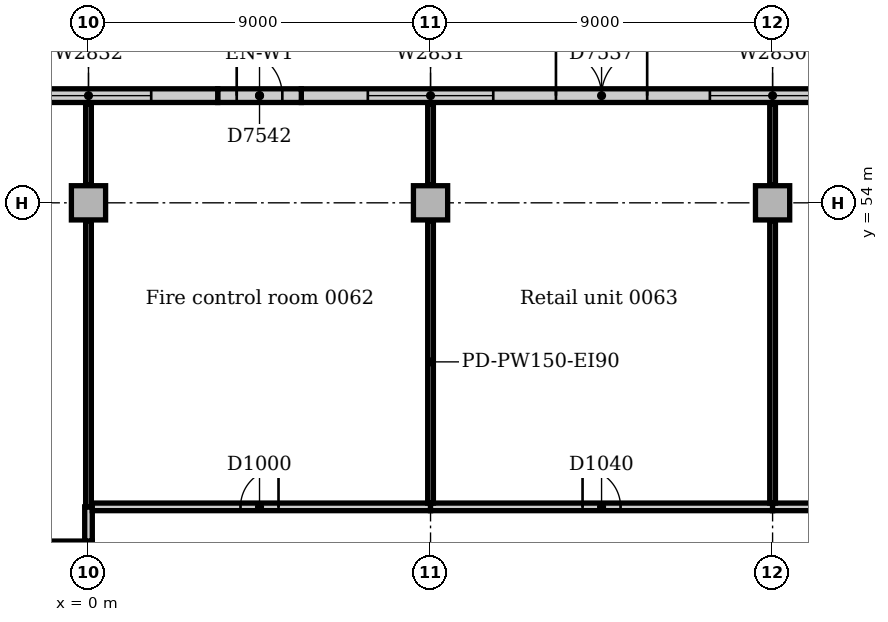
"""IFC4 building model, lengths in metres.
Left out: names, types, materials, properties, quantities, classifications, styles, units other than length and angle.
Written with IfcOpenShell. Run it as: python <this file> out.ifc"""

import sys

from ifc_helpers import new_model, si_unit, direction, frame, frame_2d, origin, origin_2d, place, context, subcontext, project, spatial, rectangle, extrude, element, fill, save


model = new_model("IFC4")
c1 = context("Model", 3, precision=1e-05, world=origin(), true_north=direction((0.0, 1.0)))
c2 = subcontext(c1, "Body", "Model", "MODEL_VIEW")
j1 = project(units=[si_unit("LENGTHUNIT", "METRE"), si_unit("PLANEANGLEUNIT", "RADIAN")], contexts=[c1])
p1 = place(None, origin())
s1 = spatial("IfcSite", under=j1, at=p1, CompositionType="ELEMENT")
p2 = place(p1, origin())
s2 = spatial("IfcBuilding", under=s1, at=p2, CompositionType="ELEMENT")
p3 = place(p2, origin())
s3 = spatial("IfcBuildingStorey", under=s2, at=p3, CompositionType="ELEMENT", Elevation=0.0)
for number, where, z_axis, x_axis in (
    (1, (0.0, 54.0, 0.0), (0.0, 0.0, 1.0), (1.0, 0.0, 0.0)),
    (2, (9.0, 54.0, 0.0), (0.0, 0.0, 1.0), (1.0, 0.0, 0.0)),
    (3, (18.0, 54.0, 0.0), (0.0, 0.0, 1.0), (1.0, 0.0, 0.0)),
):
    element("IfcColumn", number, at=place(p3, frame(where, z_axis=z_axis, x_axis=x_axis)), inside=s3, PredefinedType="COLUMN", context=c2, shape_type="SweptSolid", body=[
        extrude(rectangle(XDim=0.9, YDim=0.9, at=origin_2d()), origin(), (0.0, 0.0, 1.0), 5.7),
    ])
p4 = place(p3, frame((63.0, 56.82, 0.0), z_axis=(0.0, 0.0, 1.0), x_axis=(-1.0, 0.0, 0.0)))
e4 = element("IfcWall", 4, at=p4, inside=s3, PredefinedType="STANDARD", context=c2, shape_type="SweptSolid", body=[
    extrude(rectangle(XDim=57.4, YDim=0.36, at=frame_2d((28.7, 0.0))), origin(), (0.0, 0.0, 1.0), 5.7),
])
p5 = place(p4, frame((32.55, 0.0, 0.0)))
e5 = element("IfcOpeningElement", 5, at=p5, cuts=e4, PredefinedType="OPENING", context=c2, shape_type="SweptSolid", body=[
    extrude(rectangle(XDim=2.4, YDim=2.4, at=frame_2d((1.2, 1.2))), frame((0.0, 0.19, 0.0), z_axis=(0.0, -1.0, 0.0), x_axis=(1.0, 0.0, 0.0)), (0.0, 0.0, 1.0), 0.38),
])
p6 = place(p4, frame((48.3, 0.0, 0.0)))
e6 = element("IfcOpeningElement", 6, at=p6, cuts=e4, PredefinedType="OPENING", context=c2, shape_type="SweptSolid", body=[
    extrude(rectangle(XDim=2.4, YDim=2.2, at=frame_2d((1.2, 1.1))), frame((0.0, 0.19, 0.0), z_axis=(0.0, -1.0, 0.0), x_axis=(1.0, 0.0, 0.0)), (0.0, 0.0, 1.0), 0.38),
])
p7 = place(p4, frame((39.3, 0.0, 0.0)))
e7 = element("IfcOpeningElement", 7, at=p7, cuts=e4, PredefinedType="OPENING", context=c2, shape_type="SweptSolid", body=[
    extrude(rectangle(XDim=2.4, YDim=2.2, at=frame_2d((1.2, 1.1))), frame((0.0, 0.19, 0.0), z_axis=(0.0, -1.0, 0.0), x_axis=(1.0, 0.0, 0.0)), (0.0, 0.0, 1.0), 0.38),
])
p8 = place(p4, frame((12.3, 0.0, 0.0)))
e8 = element("IfcOpeningElement", 8, at=p8, cuts=e4, PredefinedType="OPENING", context=c2, shape_type="SweptSolid", body=[
    extrude(rectangle(XDim=2.4, YDim=2.2, at=frame_2d((1.2, 1.1))), frame((0.0, 0.19, 0.0), z_axis=(0.0, -1.0, 0.0), x_axis=(1.0, 0.0, 0.0)), (0.0, 0.0, 1.0), 0.38),
])
p9 = place(p4, frame((21.6, 0.0, 0.0)))
e9 = element("IfcOpeningElement", 9, at=p9, cuts=e4, PredefinedType="OPENING", context=c2, shape_type="SweptSolid", body=[
    extrude(rectangle(XDim=1.8, YDim=2.2, at=frame_2d((0.9, 1.1))), frame((0.0, 0.19, 0.0), z_axis=(0.0, -1.0, 0.0), x_axis=(1.0, 0.0, 0.0)), (0.0, 0.0, 1.0), 0.38),
])
p10 = place(p4, frame((2.1, 0.0, 0.0)))
e10 = element("IfcOpeningElement", 10, at=p10, cuts=e4, PredefinedType="OPENING", context=c2, shape_type="SweptSolid", body=[
    extrude(rectangle(XDim=1.8, YDim=2.2, at=frame_2d((0.9, 1.1))), frame((0.0, 0.19, 0.0), z_axis=(0.0, -1.0, 0.0), x_axis=(1.0, 0.0, 0.0)), (0.0, 0.0, 1.0), 0.38),
])
p11 = place(p4, frame((7.35, 0.0, 0.6)))
e11 = element("IfcOpeningElement", 11, at=p11, cuts=e4, PredefinedType="OPENING", context=c2, shape_type="SweptSolid", body=[
    extrude(rectangle(XDim=3.3, YDim=3.0, at=frame_2d((1.65, 1.5))), frame((0.0, 0.19, 0.0), z_axis=(0.0, -1.0, 0.0), x_axis=(1.0, 0.0, 0.0)), (0.0, 0.0, 1.0), 0.38),
])
p12 = place(p4, frame((16.35, 0.0, 0.6)))
e12 = element("IfcOpeningElement", 12, at=p12, cuts=e4, PredefinedType="OPENING", context=c2, shape_type="SweptSolid", body=[
    extrude(rectangle(XDim=3.3, YDim=3.0, at=frame_2d((1.65, 1.5))), frame((0.0, 0.19, 0.0), z_axis=(0.0, -1.0, 0.0), x_axis=(1.0, 0.0, 0.0)), (0.0, 0.0, 1.0), 0.38),
])
p13 = place(p4, frame((25.35, 0.0, 0.6)))
e13 = element("IfcOpeningElement", 13, at=p13, cuts=e4, PredefinedType="OPENING", context=c2, shape_type="SweptSolid", body=[
    extrude(rectangle(XDim=3.3, YDim=3.0, at=frame_2d((1.65, 1.5))), frame((0.0, 0.19, 0.0), z_axis=(0.0, -1.0, 0.0), x_axis=(1.0, 0.0, 0.0)), (0.0, 0.0, 1.0), 0.38),
])
p14 = place(p4, frame((43.35, 0.0, 0.6)))
e14 = element("IfcOpeningElement", 14, at=p14, cuts=e4, PredefinedType="OPENING", context=c2, shape_type="SweptSolid", body=[
    extrude(rectangle(XDim=3.3, YDim=3.0, at=frame_2d((1.65, 1.5))), frame((0.0, 0.19, 0.0), z_axis=(0.0, -1.0, 0.0), x_axis=(1.0, 0.0, 0.0)), (0.0, 0.0, 1.0), 0.38),
])
p15 = place(p4, frame((52.35, 0.0, 0.6)))
e15 = element("IfcOpeningElement", 15, at=p15, cuts=e4, PredefinedType="OPENING", context=c2, shape_type="SweptSolid", body=[
    extrude(rectangle(XDim=3.3, YDim=3.0, at=frame_2d((1.65, 1.5))), frame((0.0, 0.19, 0.0), z_axis=(0.0, -1.0, 0.0), x_axis=(1.0, 0.0, 0.0)), (0.0, 0.0, 1.0), 0.38),
])
p16 = place(p3, frame((5.6, 56.82, 0.0), z_axis=(0.0, 0.0, 1.0), x_axis=(-1.0, 0.0, 0.0)))
e16 = element("IfcWall", 16, at=p16, inside=s3, PredefinedType="STANDARD", context=c2, shape_type="SweptSolid", body=[
    extrude(rectangle(XDim=2.2, YDim=0.36, at=frame_2d((1.1, 0.0))), origin(), (0.0, 0.0, 1.0), 5.7),
])
p17 = place(p16, frame((0.5, 0.0, 0.0)))
e17 = element("IfcOpeningElement", 17, at=p17, cuts=e16, PredefinedType="OPENING", context=c2, shape_type="SweptSolid", body=[
    extrude(rectangle(XDim=1.2, YDim=2.2, at=frame_2d((0.6, 1.1))), frame((0.0, 0.19, 0.0), z_axis=(0.0, -1.0, 0.0), x_axis=(1.0, 0.0, 0.0)), (0.0, 0.0, 1.0), 0.38),
])
p18 = place(p3, frame((3.4, 56.82, 0.0), z_axis=(0.0, 0.0, 1.0), x_axis=(-1.0, 0.0, 0.0)))
e18 = element("IfcWall", 18, at=p18, inside=s3, PredefinedType="STANDARD", context=c2, shape_type="SweptSolid", body=[
    extrude(rectangle(XDim=84.4, YDim=0.36, at=frame_2d((42.2, 0.0))), origin(), (0.0, 0.0, 1.0), 5.7),
])
p19 = place(p18, frame((15.7, 0.0, 0.0)))
e19 = element("IfcOpeningElement", 19, at=p19, cuts=e18, PredefinedType="OPENING", context=c2, shape_type="SweptSolid", body=[
    extrude(rectangle(XDim=2.4, YDim=2.4, at=frame_2d((1.2, 1.2))), frame((0.0, 0.19, 0.0), z_axis=(0.0, -1.0, 0.0), x_axis=(1.0, 0.0, 0.0)), (0.0, 0.0, 1.0), 0.38),
])
p20 = place(p18, frame((76.6, 0.0, 0.0)))
e20 = element("IfcOpeningElement", 20, at=p20, cuts=e18, PredefinedType="OPENING", context=c2, shape_type="SweptSolid", body=[
    extrude(rectangle(XDim=6.6, YDim=4.2, at=frame_2d((3.3, 2.1))), frame((0.0, 0.19, 0.0), z_axis=(0.0, -1.0, 0.0), x_axis=(1.0, 0.0, 0.0)), (0.0, 0.0, 1.0), 0.38),
])
p21 = place(p18, frame((59.65, 0.0, 0.0)))
e21 = element("IfcOpeningElement", 21, at=p21, cuts=e18, PredefinedType="OPENING", context=c2, shape_type="SweptSolid", body=[
    extrude(rectangle(XDim=4.5, YDim=4.2, at=frame_2d((2.25, 2.1))), frame((0.0, 0.19, 0.0), z_axis=(0.0, -1.0, 0.0), x_axis=(1.0, 0.0, 0.0)), (0.0, 0.0, 1.0), 0.38),
])
p22 = place(p18, frame((58.3, 0.0, 0.0)))
e22 = element("IfcOpeningElement", 22, at=p22, cuts=e18, PredefinedType="OPENING", context=c2, shape_type="SweptSolid", body=[
    extrude(rectangle(XDim=1.2, YDim=2.2, at=frame_2d((0.6, 1.1))), frame((0.0, 0.19, 0.0), z_axis=(0.0, -1.0, 0.0), x_axis=(1.0, 0.0, 0.0)), (0.0, 0.0, 1.0), 0.38),
])
p23 = place(p18, frame((70.0, 0.0, 0.0)))
e23 = element("IfcOpeningElement", 23, at=p23, cuts=e18, PredefinedType="OPENING", context=c2, shape_type="SweptSolid", body=[
    extrude(rectangle(XDim=1.8, YDim=2.2, at=frame_2d((0.9, 1.1))), frame((0.0, 0.19, 0.0), z_axis=(0.0, -1.0, 0.0), x_axis=(1.0, 0.0, 0.0)), (0.0, 0.0, 1.0), 0.38),
])
p24 = place(p18, frame((52.0, 0.0, 0.0)))
e24 = element("IfcOpeningElement", 24, at=p24, cuts=e18, PredefinedType="OPENING", context=c2, shape_type="SweptSolid", body=[
    extrude(rectangle(XDim=1.8, YDim=2.2, at=frame_2d((0.9, 1.1))), frame((0.0, 0.19, 0.0), z_axis=(0.0, -1.0, 0.0), x_axis=(1.0, 0.0, 0.0)), (0.0, 0.0, 1.0), 0.38),
])
p25 = place(p18, frame((1.75, 0.0, 0.6)))
e25 = element("IfcOpeningElement", 25, at=p25, cuts=e18, PredefinedType="OPENING", context=c2, shape_type="SweptSolid", body=[
    extrude(rectangle(XDim=3.3, YDim=3.0, at=frame_2d((1.65, 1.5))), frame((0.0, 0.19, 0.0), z_axis=(0.0, -1.0, 0.0), x_axis=(1.0, 0.0, 0.0)), (0.0, 0.0, 1.0), 0.38),
])
p26 = place(p18, frame((6.25, 0.0, 0.6)))
e26 = element("IfcOpeningElement", 26, at=p26, cuts=e18, PredefinedType="OPENING", context=c2, shape_type="SweptSolid", body=[
    extrude(rectangle(XDim=3.3, YDim=3.0, at=frame_2d((1.65, 1.5))), frame((0.0, 0.19, 0.0), z_axis=(0.0, -1.0, 0.0), x_axis=(1.0, 0.0, 0.0)), (0.0, 0.0, 1.0), 0.38),
])
p27 = place(p18, frame((10.75, 0.0, 0.6)))
e27 = element("IfcOpeningElement", 27, at=p27, cuts=e18, PredefinedType="OPENING", context=c2, shape_type="SweptSolid", body=[
    extrude(rectangle(XDim=3.3, YDim=3.0, at=frame_2d((1.65, 1.5))), frame((0.0, 0.19, 0.0), z_axis=(0.0, -1.0, 0.0), x_axis=(1.0, 0.0, 0.0)), (0.0, 0.0, 1.0), 0.38),
])
p28 = place(p18, frame((19.75, 0.0, 0.6)))
e28 = element("IfcOpeningElement", 28, at=p28, cuts=e18, PredefinedType="OPENING", context=c2, shape_type="SweptSolid", body=[
    extrude(rectangle(XDim=3.3, YDim=3.0, at=frame_2d((1.65, 1.5))), frame((0.0, 0.19, 0.0), z_axis=(0.0, -1.0, 0.0), x_axis=(1.0, 0.0, 0.0)), (0.0, 0.0, 1.0), 0.38),
])
p29 = place(p18, frame((24.25, 0.0, 0.6)))
e29 = element("IfcOpeningElement", 29, at=p29, cuts=e18, PredefinedType="OPENING", context=c2, shape_type="SweptSolid", body=[
    extrude(rectangle(XDim=3.3, YDim=3.0, at=frame_2d((1.65, 1.5))), frame((0.0, 0.19, 0.0), z_axis=(0.0, -1.0, 0.0), x_axis=(1.0, 0.0, 0.0)), (0.0, 0.0, 1.0), 0.38),
])
p30 = place(p18, frame((28.75, 0.0, 0.6)))
e30 = element("IfcOpeningElement", 30, at=p30, cuts=e18, PredefinedType="OPENING", context=c2, shape_type="SweptSolid", body=[
    extrude(rectangle(XDim=3.3, YDim=3.0, at=frame_2d((1.65, 1.5))), frame((0.0, 0.19, 0.0), z_axis=(0.0, -1.0, 0.0), x_axis=(1.0, 0.0, 0.0)), (0.0, 0.0, 1.0), 0.38),
])
p31 = place(p18, frame((33.25, 0.0, 0.6)))
e31 = element("IfcOpeningElement", 31, at=p31, cuts=e18, PredefinedType="OPENING", context=c2, shape_type="SweptSolid", body=[
    extrude(rectangle(XDim=3.3, YDim=3.0, at=frame_2d((1.65, 1.5))), frame((0.0, 0.19, 0.0), z_axis=(0.0, -1.0, 0.0), x_axis=(1.0, 0.0, 0.0)), (0.0, 0.0, 1.0), 0.38),
])
p32 = place(p18, frame((37.75, 0.0, 0.6)))
e32 = element("IfcOpeningElement", 32, at=p32, cuts=e18, PredefinedType="OPENING", context=c2, shape_type="SweptSolid", body=[
    extrude(rectangle(XDim=3.3, YDim=3.0, at=frame_2d((1.65, 1.5))), frame((0.0, 0.19, 0.0), z_axis=(0.0, -1.0, 0.0), x_axis=(1.0, 0.0, 0.0)), (0.0, 0.0, 1.0), 0.38),
])
p33 = place(p18, frame((42.25, 0.0, 0.6)))
e33 = element("IfcOpeningElement", 33, at=p33, cuts=e18, PredefinedType="OPENING", context=c2, shape_type="SweptSolid", body=[
    extrude(rectangle(XDim=3.3, YDim=3.0, at=frame_2d((1.65, 1.5))), frame((0.0, 0.19, 0.0), z_axis=(0.0, -1.0, 0.0), x_axis=(1.0, 0.0, 0.0)), (0.0, 0.0, 1.0), 0.38),
])
p34 = place(p18, frame((46.75, 0.0, 0.6)))
e34 = element("IfcOpeningElement", 34, at=p34, cuts=e18, PredefinedType="OPENING", context=c2, shape_type="SweptSolid", body=[
    extrude(rectangle(XDim=3.3, YDim=3.0, at=frame_2d((1.65, 1.5))), frame((0.0, 0.19, 0.0), z_axis=(0.0, -1.0, 0.0), x_axis=(1.0, 0.0, 0.0)), (0.0, 0.0, 1.0), 0.38),
])
p35 = place(p3, frame((-8.53, 45.0, 0.0), z_axis=(0.0, 0.0, 1.0), x_axis=(1.0, 0.0, 0.0)))
e35 = element("IfcWall", 35, at=p35, inside=s3, PredefinedType="PARTITIONING", context=c2, shape_type="SweptSolid", body=[
    extrude(rectangle(XDim=8.63, YDim=0.2, at=frame_2d((4.315, 0.0))), origin(), (0.0, 0.0, 1.0), 5.7),
])
p36 = place(p3, frame((0.0, 45.1, 0.0), z_axis=(0.0, 0.0, 1.0), x_axis=(0.0, 1.0, 0.0)))
e36 = element("IfcWall", 36, at=p36, inside=s3, PredefinedType="PARTITIONING", context=c2, shape_type="SweptSolid", body=[
    extrude(rectangle(XDim=0.9, YDim=0.2, at=frame_2d((0.45, 0.0))), origin(), (0.0, 0.0, 1.0), 5.7),
])
p37 = place(p3, frame((0.0, 46.0, 0.0), z_axis=(0.0, 0.0, 1.0), x_axis=(0.0, 1.0, 0.0)))
e37 = element("IfcWall", 37, at=p37, inside=s3, PredefinedType="PARTITIONING", context=c2, shape_type="SweptSolid", body=[
    extrude(rectangle(XDim=7.53, YDim=0.15, at=frame_2d((3.765, 0.0))), origin(), (0.0, 0.0, 1.0), 5.7),
])
p38 = place(p3, frame((0.0, 54.47, 0.0), z_axis=(0.0, 0.0, 1.0), x_axis=(0.0, 1.0, 0.0)))
e38 = element("IfcWall", 38, at=p38, inside=s3, PredefinedType="PARTITIONING", context=c2, shape_type="SweptSolid", body=[
    extrude(rectangle(XDim=2.13, YDim=0.15, at=frame_2d((1.065, 0.0))), origin(), (0.0, 0.0, 1.0), 5.7),
])
p39 = place(p3, frame((0.1, 46.0, 0.0), z_axis=(0.0, 0.0, 1.0), x_axis=(1.0, 0.0, 0.0)))
e39 = element("IfcWall", 39, at=p39, inside=s3, PredefinedType="PARTITIONING", context=c2, shape_type="SweptSolid", body=[
    extrude(rectangle(XDim=8.9, YDim=0.2, at=frame_2d((4.45, 0.0))), origin(), (0.0, 0.0, 1.0), 5.7),
])
p40 = place(p39, frame((3.9, 0.0, 0.0)))
e40 = element("IfcOpeningElement", 40, at=p40, cuts=e39, PredefinedType="OPENING", context=c2, shape_type="SweptSolid", body=[
    extrude(rectangle(XDim=1.0, YDim=2.1, at=frame_2d((0.5, 1.05))), frame((0.0, 0.11, 0.0), z_axis=(0.0, -1.0, 0.0), x_axis=(1.0, 0.0, 0.0)), (0.0, 0.0, 1.0), 0.22),
])
p41 = place(p3, frame((9.0, 46.0, 0.0), z_axis=(0.0, 0.0, 1.0), x_axis=(1.0, 0.0, 0.0)))
e41 = element("IfcWall", 41, at=p41, inside=s3, PredefinedType="PARTITIONING", context=c2, shape_type="SweptSolid", body=[
    extrude(rectangle(XDim=9.0, YDim=0.2, at=frame_2d((4.5, 0.0))), origin(), (0.0, 0.0, 1.0), 5.7),
])
p42 = place(p41, frame((4.0, 0.0, 0.0)))
e42 = element("IfcOpeningElement", 42, at=p42, cuts=e41, PredefinedType="OPENING", context=c2, shape_type="SweptSolid", body=[
    extrude(rectangle(XDim=1.0, YDim=2.1, at=frame_2d((0.5, 1.05))), frame((0.0, 0.11, 0.0), z_axis=(0.0, -1.0, 0.0), x_axis=(1.0, 0.0, 0.0)), (0.0, 0.0, 1.0), 0.22),
])
p43 = place(p3, frame((18.0, 46.0, 0.0), z_axis=(0.0, 0.0, 1.0), x_axis=(1.0, 0.0, 0.0)))
e43 = element("IfcWall", 43, at=p43, inside=s3, PredefinedType="PARTITIONING", context=c2, shape_type="SweptSolid", body=[
    extrude(rectangle(XDim=9.0, YDim=0.2, at=frame_2d((4.5, 0.0))), origin(), (0.0, 0.0, 1.0), 5.7),
])
p44 = place(p43, frame((7.7, 0.0, 0.0)))
e44 = element("IfcOpeningElement", 44, at=p44, cuts=e43, PredefinedType="OPENING", context=c2, shape_type="SweptSolid", body=[
    extrude(rectangle(XDim=1.0, YDim=2.1, at=frame_2d((0.5, 1.05))), frame((0.0, 0.11, 0.0), z_axis=(0.0, -1.0, 0.0), x_axis=(1.0, 0.0, 0.0)), (0.0, 0.0, 1.0), 0.22),
])
p45 = place(p3, frame((9.0, 46.1, 0.0), z_axis=(0.0, 0.0, 1.0), x_axis=(0.0, 1.0, 0.0)))
e45 = element("IfcWall", 45, at=p45, inside=s3, PredefinedType="PARTITIONING", context=c2, shape_type="SweptSolid", body=[
    extrude(rectangle(XDim=7.43, YDim=0.15, at=frame_2d((3.715, 0.0))), origin(), (0.0, 0.0, 1.0), 5.7),
])
p46 = place(p3, frame((9.0, 54.47, 0.0), z_axis=(0.0, 0.0, 1.0), x_axis=(0.0, 1.0, 0.0)))
e46 = element("IfcWall", 46, at=p46, inside=s3, PredefinedType="PARTITIONING", context=c2, shape_type="SweptSolid", body=[
    extrude(rectangle(XDim=2.13, YDim=0.15, at=frame_2d((1.065, 0.0))), origin(), (0.0, 0.0, 1.0), 5.7),
])
p47 = place(p3, frame((18.0, 46.1, 0.0), z_axis=(0.0, 0.0, 1.0), x_axis=(0.0, 1.0, 0.0)))
e47 = element("IfcWall", 47, at=p47, inside=s3, PredefinedType="PARTITIONING", context=c2, shape_type="SweptSolid", body=[
    extrude(rectangle(XDim=7.43, YDim=0.15, at=frame_2d((3.715, 0.0))), origin(), (0.0, 0.0, 1.0), 5.7),
])
p48 = place(p3, frame((18.0, 54.47, 0.0), z_axis=(0.0, 0.0, 1.0), x_axis=(0.0, 1.0, 0.0)))
e48 = element("IfcWall", 48, at=p48, inside=s3, PredefinedType="PARTITIONING", context=c2, shape_type="SweptSolid", body=[
    extrude(rectangle(XDim=2.13, YDim=0.15, at=frame_2d((1.065, 0.0))), origin(), (0.0, 0.0, 1.0), 5.7),
])
p49 = place(p6, frame((2.4, 0.0, 0.0), z_axis=(0.0, 0.0, 1.0), x_axis=(-1.0, 0.0, 0.0)))
e49 = element("IfcDoor", 49, at=p49, inside=s3, OperationType="DOUBLE_DOOR_SINGLE_SWING", PredefinedType="DOOR", context=c2, shape_type="SweptSolid", body=[
    extrude(rectangle(XDim=2.4, YDim=2.2, at=frame_2d((1.2, 1.1))), frame((0.0, -0.07, 0.0), z_axis=(0.0, -1.0, 0.0), x_axis=(1.0, 0.0, 0.0)), (0.0, 0.0, 1.0), 0.05),
])
fill(e6, e49)
p50 = place(p14, origin())
e50 = element("IfcWindow", 50, at=p50, inside=s3, PartitioningType="SINGLE_PANEL", PredefinedType="WINDOW", context=c2, shape_type="SweptSolid", body=[
    extrude(rectangle(XDim=3.3, YDim=3.0, at=frame_2d((1.65, 1.5))), frame((0.0, 0.13, 0.0), z_axis=(0.0, -1.0, 0.0), x_axis=(1.0, 0.0, 0.0)), (0.0, 0.0, 1.0), 0.06),
])
fill(e14, e50)
p51 = place(p15, origin())
e51 = element("IfcWindow", 51, at=p51, inside=s3, PartitioningType="SINGLE_PANEL", PredefinedType="WINDOW", context=c2, shape_type="SweptSolid", body=[
    extrude(rectangle(XDim=3.3, YDim=3.0, at=frame_2d((1.65, 1.5))), frame((0.0, 0.13, 0.0), z_axis=(0.0, -1.0, 0.0), x_axis=(1.0, 0.0, 0.0)), (0.0, 0.0, 1.0), 0.06),
])
fill(e15, e51)
p52 = place(p17, frame((1.2, 0.0, 0.0), z_axis=(0.0, 0.0, 1.0), x_axis=(-1.0, 0.0, 0.0)))
e52 = element("IfcDoor", 52, at=p52, inside=s3, OperationType="SINGLE_SWING_LEFT", PredefinedType="DOOR", context=c2, shape_type="SweptSolid", body=[
    extrude(rectangle(XDim=1.2, YDim=2.2, at=frame_2d((0.6, 1.1))), frame((0.0, -0.07, 0.0), z_axis=(0.0, -1.0, 0.0), x_axis=(1.0, 0.0, 0.0)), (0.0, 0.0, 1.0), 0.05),
])
fill(e17, e52)
p53 = place(p25, origin())
e53 = element("IfcWindow", 53, at=p53, inside=s3, PartitioningType="SINGLE_PANEL", PredefinedType="WINDOW", context=c2, shape_type="SweptSolid", body=[
    extrude(rectangle(XDim=3.3, YDim=3.0, at=frame_2d((1.65, 1.5))), frame((0.0, 0.13, 0.0), z_axis=(0.0, -1.0, 0.0), x_axis=(1.0, 0.0, 0.0)), (0.0, 0.0, 1.0), 0.06),
])
fill(e25, e53)
p54 = place(p40, origin())
e54 = element("IfcDoor", 54, at=p54, inside=s3, OperationType="SINGLE_SWING_RIGHT", PredefinedType="DOOR", context=c2, shape_type="SweptSolid", body=[
    extrude(rectangle(XDim=1.0, YDim=2.1, at=frame_2d((0.5, 1.05))), frame((0.0, 0.025, 0.0), z_axis=(0.0, -1.0, 0.0), x_axis=(1.0, 0.0, 0.0)), (0.0, 0.0, 1.0), 0.05),
])
fill(e40, e54)
p55 = place(p42, origin())
e55 = element("IfcDoor", 55, at=p55, inside=s3, OperationType="SINGLE_SWING_LEFT", PredefinedType="DOOR", context=c2, shape_type="SweptSolid", body=[
    extrude(rectangle(XDim=1.0, YDim=2.1, at=frame_2d((0.5, 1.05))), frame((0.0, 0.025, 0.0), z_axis=(0.0, -1.0, 0.0), x_axis=(1.0, 0.0, 0.0)), (0.0, 0.0, 1.0), 0.05),
])
fill(e42, e55)
save(model, sys.argv[1])
